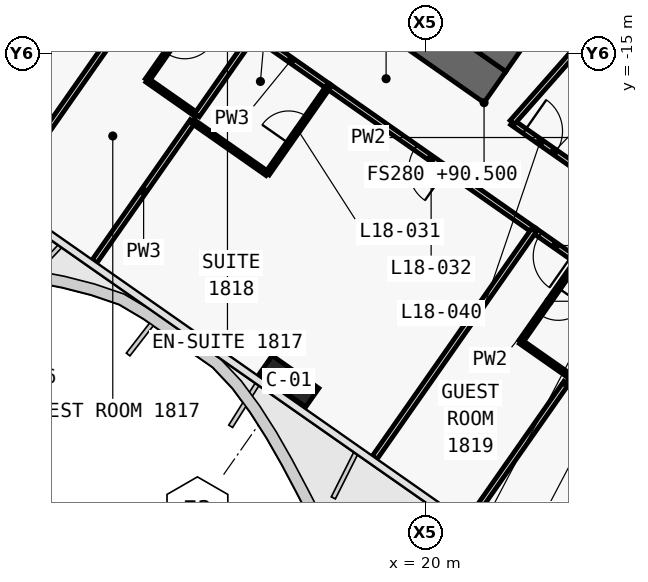
"""IFC4 building model, lengths in metres.
Left out: names, types, materials, properties, quantities, classifications, styles, units other than length and angle.
Written with IfcOpenShell. Run it as: python <this file> out.ifc"""

import sys

from ifc_helpers import new_model, si_unit, direction, frame, frame_2d, origin, origin_2d, place, context, subcontext, project, spatial, polyline, rectangle, outline, extrude, element, fill, save


model = new_model("IFC4")
c1 = context("Model", 3, precision=1e-05, world=origin(), true_north=direction((0.0, 1.0)))
c2 = subcontext(c1, "Body", "Model", "MODEL_VIEW")
j1 = project(units=[si_unit("LENGTHUNIT", "METRE"), si_unit("PLANEANGLEUNIT", "RADIAN")], contexts=[c1])
p1 = place(None, origin())
s1 = spatial("IfcSite", under=j1, at=p1, CompositionType="ELEMENT")
p2 = place(p1, origin())
s2 = spatial("IfcBuilding", under=s1, at=p2, CompositionType="ELEMENT")
p3 = place(p2, frame((0.0, 0.0, 90.5)))
s3 = spatial("IfcBuildingStorey", under=s2, at=p3, CompositionType="ELEMENT", Elevation=90.5)
p4 = place(p3, frame((-0.037, -0.585, 0.0), z_axis=(0.0, 0.0, 1.0), x_axis=(0.819157152511, -0.573569140985, 0.0)))
e1 = element("IfcWall", 1, at=p4, inside=s3, PredefinedType="SHEAR", context=c2, shape_type="SweptSolid", body=[
    extrude(outline(polyline([(26.695, 0.5), (0.0, 0.5), (0.7, -0.5), (26.695, -0.5), (26.695, 0.5)])), origin(), (0.0, 0.0, 1.0), 3.6),
])
p5 = place(p4, frame((1.045, 0.0, 0.0)))
e2 = element("IfcOpeningElement", 2, at=p5, cuts=e1, PredefinedType="OPENING", context=c2, shape_type="SweptSolid", body=[
    extrude(rectangle(XDim=1.5, YDim=2.1, at=frame_2d((0.75, 1.05))), frame((0.0, 0.51, 0.0), z_axis=(0.0, -1.0, 0.0), x_axis=(1.0, 0.0, 0.0)), (0.0, 0.0, 1.0), 1.02),
])
p6 = place(p4, frame((12.445, 0.0, 0.0)))
e3 = element("IfcOpeningElement", 3, at=p6, cuts=e1, PredefinedType="OPENING", context=c2, shape_type="SweptSolid", body=[
    extrude(rectangle(XDim=1.5, YDim=2.1, at=frame_2d((0.75, 1.05))), frame((0.0, 0.51, 0.0), z_axis=(0.0, -1.0, 0.0), x_axis=(1.0, 0.0, 0.0)), (0.0, 0.0, 1.0), 1.02),
])
p7 = place(p3, frame((21.708, -15.2, 0.0), z_axis=(0.0, 0.0, 1.0), x_axis=(0.573576324356, 0.819152122709, 0.0)))
e4 = element("IfcWall", 4, at=p7, inside=s3, PredefinedType="SHEAR", context=c2, shape_type="SweptSolid", body=[
    extrude(outline(polyline([(9.2, 0.5), (0.0, 0.5), (0.0, -0.5), (9.2, -0.5), (9.2, 0.5)])), origin(), (0.0, 0.0, 1.0), 3.6),
])
p8 = place(p7, frame((6.1, 0.0, 0.0)))
e5 = element("IfcOpeningElement", 5, at=p8, cuts=e4, PredefinedType="OPENING", context=c2, shape_type="SweptSolid", body=[
    extrude(rectangle(XDim=1.8, YDim=2.1, at=frame_2d((0.9, 1.05))), frame((0.0, 0.51, 0.0), z_axis=(0.0, -1.0, 0.0), x_axis=(1.0, 0.0, 0.0)), (0.0, 0.0, 1.0), 1.02),
])
p9 = place(p7, frame((1.9, 0.0, 0.0)))
e6 = element("IfcOpeningElement", 6, at=p9, cuts=e4, PredefinedType="OPENING", context=c2, shape_type="SweptSolid", body=[
    extrude(rectangle(XDim=1.8, YDim=2.1, at=frame_2d((0.9, 1.05))), frame((0.0, 0.51, 0.0), z_axis=(0.0, -1.0, 0.0), x_axis=(1.0, 0.0, 0.0)), (0.0, 0.0, 1.0), 1.02),
])
p10 = place(p3, frame((16.41, -23.637, 0.0), z_axis=(0.0, 0.0, 1.0), x_axis=(0.819152044289, -0.573576436351, 0.0)))
e7 = element("IfcColumn", 7, at=p10, inside=s3, PredefinedType="COLUMN", context=c2, shape_type="SweptSolid", body=[
    extrude(rectangle(XDim=1.5, YDim=0.6, at=origin_2d()), origin(), (0.0, 0.0, 1.0), 3.6),
])
p11 = place(p3, frame((22.284, -16.824, 0.0), z_axis=(0.0, 0.0, 1.0), x_axis=(0.819176640776, -0.573541307325, 0.0)))
e8 = element("IfcWall", 8, at=p11, inside=s3, PredefinedType="PARTITIONING", context=c2, shape_type="SweptSolid", body=[
    extrude(rectangle(XDim=2.698, YDim=0.15, at=frame_2d((1.349, 0.0))), origin(), (0.0, 0.0, 1.0), 3.32),
])
p12 = place(p11, frame((0.396, 0.0, 0.0)))
e9 = element("IfcOpeningElement", 9, at=p12, cuts=e8, PredefinedType="OPENING", context=c2, shape_type="SweptSolid", body=[
    extrude(rectangle(XDim=1.0, YDim=2.1, at=frame_2d((0.5, 1.05))), frame((0.0, 0.085, 0.0), z_axis=(0.0, -1.0, 0.0), x_axis=(1.0, 0.0, 0.0)), (0.0, 0.0, 1.0), 0.17),
])
p13 = place(p3, frame((22.855, -19.666, 0.0), z_axis=(0.0, 0.0, 1.0), x_axis=(-0.819153746897, 0.573574004767, 0.0)))
e10 = element("IfcWall", 10, at=p13, inside=s3, PredefinedType="PARTITIONING", context=c2, shape_type="SweptSolid", body=[
    extrude(rectangle(XDim=6.603, YDim=0.15, at=frame_2d((3.302, 0.0))), origin(), (0.0, 0.0, 1.0), 2.6),
])
p14 = place(p13, frame((2.802, 0.0, 0.0)))
e11 = element("IfcOpeningElement", 11, at=p14, cuts=e10, PredefinedType="OPENING", context=c2, shape_type="SweptSolid", body=[
    extrude(rectangle(XDim=1.0, YDim=2.1, at=frame_2d((0.5, 1.05))), frame((0.0, 0.085, 0.0), z_axis=(0.0, -1.0, 0.0), x_axis=(1.0, 0.0, 0.0)), (0.0, 0.0, 1.0), 0.17),
])
p15 = place(p3, frame((17.449, -15.88, 0.0), z_axis=(0.0, 0.0, 1.0), x_axis=(-0.819179439794, 0.573537309527, 0.0)))
e12 = element("IfcWall", 12, at=p15, inside=s3, PredefinedType="PARTITIONING", context=c2, shape_type="SweptSolid", body=[
    extrude(rectangle(XDim=2.404, YDim=0.15, at=frame_2d((1.202, 0.0))), origin(), (0.0, 0.0, 1.0), 3.32),
])
p16 = place(p3, frame((24.001, -20.468, 0.0), z_axis=(0.0, 0.0, 1.0), x_axis=(-0.81914197737, 0.573590813132, 0.0)))
e13 = element("IfcWall", 13, at=p16, inside=s3, PredefinedType="PARTITIONING", context=c2, shape_type="SweptSolid", body=[
    extrude(rectangle(XDim=1.403, YDim=0.15, at=frame_2d((0.701, 0.0))), origin(), (0.0, 0.0, 1.0), 3.32),
])
p17 = place(p16, frame((0.201, 0.0, 0.0)))
e14 = element("IfcOpeningElement", 14, at=p17, cuts=e13, PredefinedType="OPENING", context=c2, shape_type="SweptSolid", body=[
    extrude(rectangle(XDim=1.0, YDim=2.1, at=frame_2d((0.5, 1.05))), frame((0.0, 0.085, 0.0), z_axis=(0.0, -1.0, 0.0), x_axis=(1.0, 0.0, 0.0)), (0.0, 0.0, 1.0), 0.17),
])
p18 = place(p3, frame((22.285, -16.825, 0.0), z_axis=(0.0, 0.0, 1.0), x_axis=(0.661551268245, 0.749899939647, 0.0)))
e15 = element("IfcWall", 15, at=p18, inside=s3, PredefinedType="PARTITIONING", context=c2, shape_type="SweptSolid", body=[
    extrude(rectangle(XDim=6.541, YDim=0.15, at=frame_2d((3.271, 0.0))), origin(), (0.0, 0.0, 1.0), 2.6),
])
p19 = place(p3, frame((13.024, -12.782, 0.0), z_axis=(0.0, 0.0, 1.0), x_axis=(-0.573556251799, -0.819166177294, 0.0)))
e16 = element("IfcWall", 16, at=p19, inside=s3, PredefinedType="PARTITIONING", context=c2, shape_type="SweptSolid", body=[
    extrude(rectangle(XDim=6.63, YDim=0.15, at=frame_2d((3.315, 0.0))), origin(), (0.0, 0.0, 1.0), 2.6),
])
p20 = place(p3, frame((14.17, -13.584, 0.0), z_axis=(0.0, 0.0, 1.0), x_axis=(-0.573537965655, -0.819178980414, 0.0)))
e17 = element("IfcWall", 17, at=p20, inside=s3, PredefinedType="PARTITIONING", context=c2, shape_type="SweptSolid", body=[
    extrude(rectangle(XDim=2.6, YDim=0.12, at=frame_2d((1.3, 0.0))), origin(), (0.0, 0.0, 1.0), 3.32),
])
p21 = place(p20, frame((0.875, 0.0, 0.0)))
e18 = element("IfcOpeningElement", 18, at=p21, cuts=e17, PredefinedType="OPENING", context=c2, shape_type="SweptSolid", body=[
    extrude(rectangle(XDim=0.85, YDim=2.05, at=frame_2d((0.425, 1.025))), frame((0.0, 0.07, 0.0), z_axis=(0.0, -1.0, 0.0), x_axis=(1.0, 0.0, 0.0)), (0.0, 0.0, 1.0), 0.14),
])
p22 = place(p3, frame((12.679, -15.716, 0.0), z_axis=(0.0, 0.0, 1.0), x_axis=(0.819131543282, -0.57360571371, 0.0)))
e19 = element("IfcWall", 19, at=p22, inside=s3, PredefinedType="PARTITIONING", context=c2, shape_type="SweptSolid", body=[
    extrude(rectangle(XDim=1.6, YDim=0.12, at=frame_2d((0.8, 0.0))), origin(), (0.0, 0.0, 1.0), 3.32),
])
p23 = place(p3, frame((13.876, -16.795, 0.0), z_axis=(0.0, 0.0, 1.0), x_axis=(-0.573556991349, -0.819165659482, 0.0)))
e20 = element("IfcWall", 20, at=p23, inside=s3, PredefinedType="PARTITIONING", context=c2, shape_type="SweptSolid", body=[
    extrude(rectangle(XDim=4.501, YDim=0.15, at=frame_2d((2.25, 0.0))), origin(), (0.0, 0.0, 1.0), 2.5),
])
p24 = place(p3, frame((15.481, -14.503, 0.0), z_axis=(0.0, 0.0, 1.0), x_axis=(-0.573582085028, -0.819148089014, 0.0)))
e21 = element("IfcWall", 21, at=p24, inside=s3, PredefinedType="PARTITIONING", context=c2, shape_type="SweptSolid", body=[
    extrude(rectangle(XDim=2.6, YDim=0.15, at=frame_2d((1.3, 0.0))), origin(), (0.0, 0.0, 1.0), 3.32),
])
p25 = place(p3, frame((13.875, -16.797, 0.0), z_axis=(0.0, 0.0, 1.0), x_axis=(0.819155442668, -0.573571582932, 0.0)))
e22 = element("IfcWall", 22, at=p25, inside=s3, PredefinedType="PARTITIONING", context=c2, shape_type="SweptSolid", body=[
    extrude(rectangle(XDim=2.4, YDim=0.12, at=frame_2d((1.2, 0.0))), origin(), (0.0, 0.0, 1.0), 3.32),
])
p26 = place(p3, frame((15.842, -18.173, 0.0), z_axis=(0.0, 0.0, 1.0), x_axis=(0.573550118428, 0.819170471667, 0.0)))
e23 = element("IfcWall", 23, at=p26, inside=s3, PredefinedType="PARTITIONING", context=c2, shape_type="SweptSolid", body=[
    extrude(rectangle(XDim=2.8, YDim=0.12, at=frame_2d((1.4, 0.0))), origin(), (0.0, 0.0, 1.0), 3.32),
])
p27 = place(p26, frame((0.975, 0.0, 0.0)))
e24 = element("IfcOpeningElement", 24, at=p27, cuts=e23, PredefinedType="OPENING", context=c2, shape_type="SweptSolid", body=[
    extrude(rectangle(XDim=0.85, YDim=2.05, at=frame_2d((0.425, 1.025))), frame((0.0, 0.07, 0.0), z_axis=(0.0, -1.0, 0.0), x_axis=(1.0, 0.0, 0.0)), (0.0, 0.0, 1.0), 0.14),
])
p28 = place(p3, frame((22.854, -19.665, 0.0), z_axis=(0.0, 0.0, 1.0), x_axis=(-0.573572324301, -0.819154923562, 0.0)))
e25 = element("IfcWall", 25, at=p28, inside=s3, PredefinedType="PARTITIONING", context=c2, shape_type="SweptSolid", body=[
    extrude(rectangle(XDim=7.3, YDim=0.15, at=frame_2d((3.65, 0.0))), origin(), (0.0, 0.0, 1.0), 2.5),
])
p29 = place(p3, frame((24.0, -20.467, 0.0), z_axis=(0.0, 0.0, 1.0), x_axis=(-0.573582085028, -0.819148089014, 0.0)))
e26 = element("IfcWall", 26, at=p29, inside=s3, PredefinedType="PARTITIONING", context=c2, shape_type="SweptSolid", body=[
    extrude(rectangle(XDim=2.6, YDim=0.12, at=frame_2d((1.3, 0.0))), origin(), (0.0, 0.0, 1.0), 3.32),
])
p30 = place(p29, frame((0.875, 0.0, 0.0)))
e27 = element("IfcOpeningElement", 27, at=p30, cuts=e26, PredefinedType="OPENING", context=c2, shape_type="SweptSolid", body=[
    extrude(rectangle(XDim=0.85, YDim=2.05, at=frame_2d((0.425, 1.025))), frame((0.0, 0.07, 0.0), z_axis=(0.0, -1.0, 0.0), x_axis=(1.0, 0.0, 0.0)), (0.0, 0.0, 1.0), 0.14),
])
p31 = place(p3, frame((22.509, -22.598, 0.0), z_axis=(0.0, 0.0, 1.0), x_axis=(0.819131543282, -0.57360571371, 0.0)))
e28 = element("IfcWall", 28, at=p31, inside=s3, PredefinedType="PARTITIONING", context=c2, shape_type="SweptSolid", body=[
    extrude(rectangle(XDim=1.6, YDim=0.12, at=frame_2d((0.8, 0.0))), origin(), (0.0, 0.0, 1.0), 3.32),
])
p32 = place(p3, frame((23.706, -23.678, 0.0), z_axis=(0.0, 0.0, 1.0), x_axis=(-0.573556991349, -0.819165659482, 0.0)))
e29 = element("IfcWall", 29, at=p32, inside=s3, PredefinedType="PARTITIONING", context=c2, shape_type="SweptSolid", body=[
    extrude(rectangle(XDim=4.501, YDim=0.15, at=frame_2d((2.25, 0.0))), origin(), (0.0, 0.0, 1.0), 2.5),
])
p33 = place(p3, frame((23.705, -23.68, 0.0), z_axis=(0.0, 0.0, 1.0), x_axis=(0.819188907105, -0.573523787192, 0.0)))
e30 = element("IfcWall", 30, at=p33, inside=s3, PredefinedType="PARTITIONING", context=c2, shape_type="SweptSolid", body=[
    extrude(rectangle(XDim=2.4, YDim=0.12, at=frame_2d((1.2, 0.0))), origin(), (0.0, 0.0, 1.0), 3.32),
])
p34 = place(p21, origin())
e31 = element("IfcDoor", 31, at=p34, inside=s3, OperationType="SINGLE_SWING_RIGHT", PredefinedType="DOOR", context=c2, shape_type="SweptSolid", body=[
    extrude(rectangle(XDim=0.85, YDim=2.05, at=frame_2d((0.425, 1.025))), frame((0.0, 0.025, 0.0), z_axis=(0.0, -1.0, 0.0), x_axis=(1.0, 0.0, 0.0)), (0.0, 0.0, 1.0), 0.05),
])
fill(e18, e31)
p35 = place(p27, origin())
e32 = element("IfcDoor", 32, at=p35, inside=s3, OperationType="SINGLE_SWING_LEFT", PredefinedType="DOOR", context=c2, shape_type="SweptSolid", body=[
    extrude(rectangle(XDim=0.85, YDim=2.05, at=frame_2d((0.425, 1.025))), frame((0.0, 0.025, 0.0), z_axis=(0.0, -1.0, 0.0), x_axis=(1.0, 0.0, 0.0)), (0.0, 0.0, 1.0), 0.05),
])
fill(e24, e32)
p36 = place(p14, origin())
e33 = element("IfcDoor", 33, at=p36, inside=s3, OperationType="SINGLE_SWING_LEFT", PredefinedType="DOOR", context=c2, shape_type="SweptSolid", body=[
    extrude(rectangle(XDim=1.0, YDim=2.1, at=frame_2d((0.5, 1.05))), frame((0.0, 0.025, 0.0), z_axis=(0.0, -1.0, 0.0), x_axis=(1.0, 0.0, 0.0)), (0.0, 0.0, 1.0), 0.05),
])
fill(e11, e33)
p37 = place(p30, origin())
e34 = element("IfcDoor", 34, at=p37, inside=s3, OperationType="SINGLE_SWING_RIGHT", PredefinedType="DOOR", context=c2, shape_type="SweptSolid", body=[
    extrude(rectangle(XDim=0.85, YDim=2.05, at=frame_2d((0.425, 1.025))), frame((0.0, 0.025, 0.0), z_axis=(0.0, -1.0, 0.0), x_axis=(1.0, 0.0, 0.0)), (0.0, 0.0, 1.0), 0.05),
])
fill(e27, e34)
p38 = place(p17, origin())
e35 = element("IfcDoor", 35, at=p38, inside=s3, OperationType="SINGLE_SWING_LEFT", PredefinedType="DOOR", context=c2, shape_type="SweptSolid", body=[
    extrude(rectangle(XDim=1.0, YDim=2.1, at=frame_2d((0.5, 1.05))), frame((0.0, 0.025, 0.0), z_axis=(0.0, -1.0, 0.0), x_axis=(1.0, 0.0, 0.0)), (0.0, 0.0, 1.0), 0.05),
])
fill(e14, e35)
p39 = place(p12, origin())
e36 = element("IfcDoor", 36, at=p39, inside=s3, OperationType="SINGLE_SWING_RIGHT", PredefinedType="DOOR", context=c2, shape_type="SweptSolid", body=[
    extrude(rectangle(XDim=1.0, YDim=2.1, at=frame_2d((0.5, 1.05))), frame((0.0, 0.025, 0.0), z_axis=(0.0, -1.0, 0.0), x_axis=(1.0, 0.0, 0.0)), (0.0, 0.0, 1.0), 0.05),
])
fill(e9, e36)
save(model, sys.argv[1])
